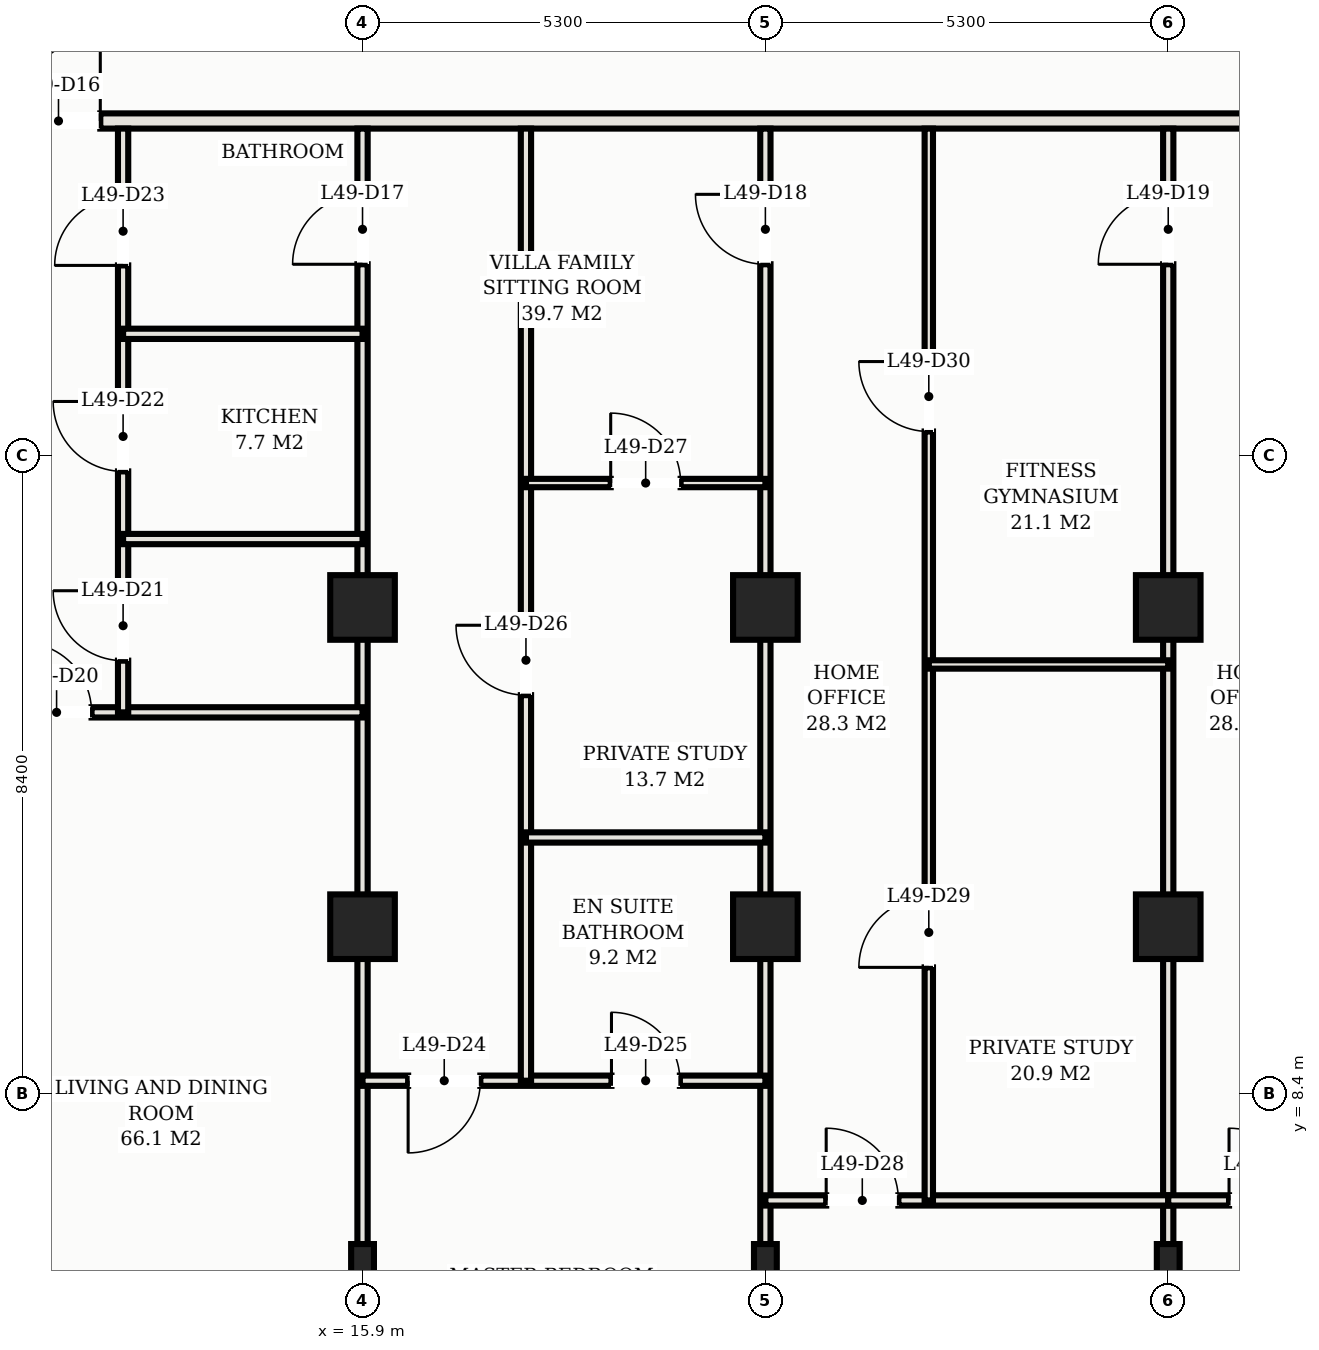
"""IFC4 building model, lengths in metres.
Left out: names, types, materials, properties, quantities, classifications, styles, units other than length and angle.
Written with IfcOpenShell. Run it as: python <this file> out.ifc"""

import sys

from ifc_helpers import new_model, si_unit, direction, frame, frame_2d, origin, origin_2d, place, context, subcontext, project, spatial, rectangle, hollow_rectangle, extrude, element, fill, save


model = new_model("IFC4")
c1 = context("Model", 3, precision=1e-05, world=origin(), true_north=direction((0.0, 1.0)))
c2 = subcontext(c1, "Body", "Model", "MODEL_VIEW")
j1 = project(units=[si_unit("LENGTHUNIT", "METRE"), si_unit("PLANEANGLEUNIT", "RADIAN")], contexts=[c1])
p1 = place(None, origin())
s1 = spatial("IfcSite", under=j1, at=p1, CompositionType="ELEMENT")
p2 = place(p1, origin())
s2 = spatial("IfcBuilding", under=s1, at=p2, CompositionType="ELEMENT")
p3 = place(p2, frame((0.0, 0.0, 178.8)))
s3 = spatial("IfcBuildingStorey", under=s2, at=p3, CompositionType="ELEMENT", Elevation=178.8)
for number, where, z_axis, x_axis in (
    (1, (15.9, 14.8, 0.0), (0.0, 0.0, 1.0), (1.0, 0.0, 0.0)),
    (2, (15.9, 10.6, 0.0), (0.0, 0.0, 1.0), (1.0, 0.0, 0.0)),
    (3, (21.2, 14.8, 0.0), (0.0, 0.0, 1.0), (1.0, 0.0, 0.0)),
    (4, (21.2, 10.6, 0.0), (0.0, 0.0, 1.0), (1.0, 0.0, 0.0)),
    (5, (26.5, 14.8, 0.0), (0.0, 0.0, 1.0), (1.0, 0.0, 0.0)),
    (6, (26.5, 10.6, 0.0), (0.0, 0.0, 1.0), (1.0, 0.0, 0.0)),
):
    element("IfcColumn", number, at=place(p3, frame(where, z_axis=z_axis, x_axis=x_axis)), inside=s3, PredefinedType="COLUMN", context=c2, shape_type="SweptSolid", body=[
        extrude(hollow_rectangle(XDim=0.85, YDim=0.85, WallThickness=0.028, at=origin_2d()), origin(), (0.0, 0.0, 1.0), 3.3),
    ])
for number, where, z_axis, x_axis in (
    (7, (15.9, 6.2, 0.0), (0.0, 0.0, 1.0), (1.0, 0.0, 0.0)),
    (8, (21.2, 6.2, 0.0), (0.0, 0.0, 1.0), (1.0, 0.0, 0.0)),
    (9, (26.5, 6.2, 0.0), (0.0, 0.0, 1.0), (1.0, 0.0, 0.0)),
):
    element("IfcColumn", number, at=place(p3, frame(where, z_axis=z_axis, x_axis=x_axis)), inside=s3, PredefinedType="COLUMN", context=c2, shape_type="SweptSolid", body=[
        extrude(hollow_rectangle(XDim=0.3, YDim=0.45, WallThickness=0.016, at=origin_2d()), origin(), (0.0, 0.0, 1.0), 3.3),
    ])
p4 = place(p3, frame((4.32, 21.2, 0.0), z_axis=(0.0, 0.0, 1.0), x_axis=(1.0, 0.0, 0.0)))
e10 = element("IfcWall", 10, at=p4, inside=s3, PredefinedType="PARTITIONING", context=c2, shape_type="SweptSolid", body=[
    extrude(rectangle(XDim=44.36, YDim=0.2, at=frame_2d((22.18, 0.0))), origin(), (0.0, 0.0, 1.0), 2.38),
])
p5 = place(p4, frame((7.03, 0.0, 0.0)))
e11 = element("IfcOpeningElement", 11, at=p5, cuts=e10, PredefinedType="OPENING", context=c2, shape_type="SweptSolid", body=[
    extrude(rectangle(XDim=1.1, YDim=2.25, at=frame_2d((0.55, 1.125))), frame((0.0, 0.11, 0.0), z_axis=(0.0, -1.0, 0.0), x_axis=(1.0, 0.0, 0.0)), (0.0, 0.0, 1.0), 0.22),
])
p6 = place(p4, frame((28.23, 0.0, 0.0)))
e12 = element("IfcOpeningElement", 12, at=p6, cuts=e10, PredefinedType="OPENING", context=c2, shape_type="SweptSolid", body=[
    extrude(rectangle(XDim=1.1, YDim=2.25, at=frame_2d((0.55, 1.125))), frame((0.0, 0.11, 0.0), z_axis=(0.0, -1.0, 0.0), x_axis=(1.0, 0.0, 0.0)), (0.0, 0.0, 1.0), 0.22),
])
p7 = place(p4, frame((2.635, 0.0, 0.0)))
e13 = element("IfcOpeningElement", 13, at=p7, cuts=e10, PredefinedType="OPENING", context=c2, shape_type="SweptSolid", body=[
    extrude(rectangle(XDim=0.92, YDim=2.15, at=frame_2d((0.46, 1.075))), frame((0.0, 0.11, 0.0), z_axis=(0.0, -1.0, 0.0), x_axis=(1.0, 0.0, 0.0)), (0.0, 0.0, 1.0), 0.22),
])
p8 = place(p4, frame((40.805, 0.0, 0.0)))
e14 = element("IfcOpeningElement", 14, at=p8, cuts=e10, PredefinedType="OPENING", context=c2, shape_type="SweptSolid", body=[
    extrude(rectangle(XDim=0.92, YDim=2.15, at=frame_2d((0.46, 1.075))), frame((0.0, 0.11, 0.0), z_axis=(0.0, -1.0, 0.0), x_axis=(1.0, 0.0, 0.0)), (0.0, 0.0, 1.0), 0.22),
])
p9 = place(p3, frame((15.9, 3.62, 0.0), z_axis=(0.0, 0.0, 1.0), x_axis=(0.0, 1.0, 0.0)))
e15 = element("IfcWall", 15, at=p9, inside=s3, PredefinedType="PARTITIONING", context=c2, shape_type="SweptSolid", body=[
    extrude(rectangle(XDim=17.48, YDim=0.135, at=frame_2d((8.74, 0.0))), origin(), (0.0, 0.0, 1.0), 2.38),
])
p10 = place(p9, frame((15.695, 0.0, 0.0)))
e16 = element("IfcOpeningElement", 16, at=p10, cuts=e15, PredefinedType="OPENING", context=c2, shape_type="SweptSolid", body=[
    extrude(rectangle(XDim=0.92, YDim=2.15, at=frame_2d((0.46, 1.075))), frame((0.0, 0.078, 0.0), z_axis=(0.0, -1.0, 0.0), x_axis=(1.0, 0.0, 0.0)), (0.0, 0.0, 1.0), 0.155),
])
p11 = place(p3, frame((21.2, 2.508, 0.0), z_axis=(0.0, 0.0, 1.0), x_axis=(0.0, 1.0, 0.0)))
e17 = element("IfcWall", 17, at=p11, inside=s3, PredefinedType="PARTITIONING", context=c2, shape_type="SweptSolid", body=[
    extrude(rectangle(XDim=18.592, YDim=0.135, at=frame_2d((9.296, 0.0))), origin(), (0.0, 0.0, 1.0), 2.38),
])
p12 = place(p11, frame((16.807, 0.0, 0.0)))
e18 = element("IfcOpeningElement", 18, at=p12, cuts=e17, PredefinedType="OPENING", context=c2, shape_type="SweptSolid", body=[
    extrude(rectangle(XDim=0.92, YDim=2.15, at=frame_2d((0.46, 1.075))), frame((0.0, 0.078, 0.0), z_axis=(0.0, -1.0, 0.0), x_axis=(1.0, 0.0, 0.0)), (0.0, 0.0, 1.0), 0.155),
])
p13 = place(p3, frame((26.5, 1.82, 0.0), z_axis=(0.0, 0.0, 1.0), x_axis=(0.0, 1.0, 0.0)))
e19 = element("IfcWall", 19, at=p13, inside=s3, PredefinedType="PARTITIONING", context=c2, shape_type="SweptSolid", body=[
    extrude(rectangle(XDim=19.28, YDim=0.135, at=frame_2d((9.64, 0.0))), origin(), (0.0, 0.0, 1.0), 2.38),
])
p14 = place(p13, frame((17.495, 0.0, 0.0)))
e20 = element("IfcOpeningElement", 20, at=p14, cuts=e19, PredefinedType="OPENING", context=c2, shape_type="SweptSolid", body=[
    extrude(rectangle(XDim=0.92, YDim=2.15, at=frame_2d((0.46, 1.075))), frame((0.0, 0.078, 0.0), z_axis=(0.0, -1.0, 0.0), x_axis=(1.0, 0.0, 0.0)), (0.0, 0.0, 1.0), 0.155),
])
p15 = place(p3, frame((10.6, 13.42, 0.0), z_axis=(0.0, 0.0, 1.0), x_axis=(1.0, 0.0, 0.0)))
e21 = element("IfcWall", 21, at=p15, inside=s3, PredefinedType="PARTITIONING", context=c2, shape_type="SweptSolid", body=[
    extrude(rectangle(XDim=5.3, YDim=0.135, at=frame_2d((2.65, 0.0))), origin(), (0.0, 0.0, 1.0), 2.38),
])
p16 = place(p15, frame((0.815, 0.0, 0.0)))
e22 = element("IfcOpeningElement", 22, at=p16, cuts=e21, PredefinedType="OPENING", context=c2, shape_type="SweptSolid", body=[
    extrude(rectangle(XDim=0.92, YDim=2.15, at=frame_2d((0.46, 1.075))), frame((0.0, 0.078, 0.0), z_axis=(0.0, -1.0, 0.0), x_axis=(1.0, 0.0, 0.0)), (0.0, 0.0, 1.0), 0.155),
])
p17 = place(p3, frame((12.75, 13.42, 0.0), z_axis=(0.0, 0.0, 1.0), x_axis=(0.0, 1.0, 0.0)))
e23 = element("IfcWall", 23, at=p17, inside=s3, PredefinedType="PARTITIONING", context=c2, shape_type="SweptSolid", body=[
    extrude(rectangle(XDim=7.68, YDim=0.135, at=frame_2d((3.84, 0.0))), origin(), (0.0, 0.0, 1.0), 2.38),
])
p18 = place(p17, frame((0.68, 0.0, 0.0)))
e24 = element("IfcOpeningElement", 24, at=p18, cuts=e23, PredefinedType="OPENING", context=c2, shape_type="SweptSolid", body=[
    extrude(rectangle(XDim=0.92, YDim=2.15, at=frame_2d((0.46, 1.075))), frame((0.0, 0.078, 0.0), z_axis=(0.0, -1.0, 0.0), x_axis=(1.0, 0.0, 0.0)), (0.0, 0.0, 1.0), 0.155),
])
p19 = place(p17, frame((3.17, 0.0, 0.0)))
e25 = element("IfcOpeningElement", 25, at=p19, cuts=e23, PredefinedType="OPENING", context=c2, shape_type="SweptSolid", body=[
    extrude(rectangle(XDim=0.92, YDim=2.15, at=frame_2d((0.46, 1.075))), frame((0.0, 0.078, 0.0), z_axis=(0.0, -1.0, 0.0), x_axis=(1.0, 0.0, 0.0)), (0.0, 0.0, 1.0), 0.155),
])
p20 = place(p17, frame((5.88, 0.0, 0.0)))
e26 = element("IfcOpeningElement", 26, at=p20, cuts=e23, PredefinedType="OPENING", context=c2, shape_type="SweptSolid", body=[
    extrude(rectangle(XDim=0.9, YDim=2.15, at=frame_2d((0.45, 1.075))), frame((0.0, 0.078, 0.0), z_axis=(0.0, -1.0, 0.0), x_axis=(1.0, 0.0, 0.0)), (0.0, 0.0, 1.0), 0.155),
])
for number, where, z_axis, x_axis in (
    (27, (12.75, 15.7, 0.0), (0.0, 0.0, 1.0), (1.0, 0.0, 0.0)),
    (28, (12.75, 18.4, 0.0), (0.0, 0.0, 1.0), (1.0, 0.0, 0.0)),
):
    element("IfcWall", number, at=place(p3, frame(where, z_axis=z_axis, x_axis=x_axis)), inside=s3, PredefinedType="PARTITIONING", context=c2, shape_type="SweptSolid", body=[
        extrude(rectangle(XDim=3.15, YDim=0.135, at=frame_2d((1.575, 0.0))), origin(), (0.0, 0.0, 1.0), 2.38),
    ])
p21 = place(p3, frame((15.9, 8.574, 0.0), z_axis=(0.0, 0.0, 1.0), x_axis=(1.0, 0.0, 0.0)))
e29 = element("IfcWall", 29, at=p21, inside=s3, PredefinedType="PARTITIONING", context=c2, shape_type="SweptSolid", body=[
    extrude(rectangle(XDim=5.3, YDim=0.135, at=frame_2d((2.65, 0.0))), origin(), (0.0, 0.0, 1.0), 2.38),
])
p22 = place(p21, frame((0.6, 0.0, 0.0)))
e30 = element("IfcOpeningElement", 30, at=p22, cuts=e29, PredefinedType="OPENING", context=c2, shape_type="SweptSolid", body=[
    extrude(rectangle(XDim=0.95, YDim=2.15, at=frame_2d((0.475, 1.075))), frame((0.0, 0.078, 0.0), z_axis=(0.0, -1.0, 0.0), x_axis=(1.0, 0.0, 0.0)), (0.0, 0.0, 1.0), 0.155),
])
p23 = place(p21, frame((3.275, 0.0, 0.0)))
e31 = element("IfcOpeningElement", 31, at=p23, cuts=e29, PredefinedType="OPENING", context=c2, shape_type="SweptSolid", body=[
    extrude(rectangle(XDim=0.9, YDim=2.15, at=frame_2d((0.45, 1.075))), frame((0.0, 0.078, 0.0), z_axis=(0.0, -1.0, 0.0), x_axis=(1.0, 0.0, 0.0)), (0.0, 0.0, 1.0), 0.155),
])
p24 = place(p3, frame((18.05, 8.574, 0.0), z_axis=(0.0, 0.0, 1.0), x_axis=(0.0, 1.0, 0.0)))
e32 = element("IfcWall", 32, at=p24, inside=s3, PredefinedType="PARTITIONING", context=c2, shape_type="SweptSolid", body=[
    extrude(rectangle(XDim=12.526, YDim=0.135, at=frame_2d((6.263, 0.0))), origin(), (0.0, 0.0, 1.0), 2.38),
])
p25 = place(p24, frame((5.072, 0.0, 0.0)))
e33 = element("IfcOpeningElement", 33, at=p25, cuts=e32, PredefinedType="OPENING", context=c2, shape_type="SweptSolid", body=[
    extrude(rectangle(XDim=0.92, YDim=2.15, at=frame_2d((0.46, 1.075))), frame((0.0, 0.078, 0.0), z_axis=(0.0, -1.0, 0.0), x_axis=(1.0, 0.0, 0.0)), (0.0, 0.0, 1.0), 0.155),
])
p26 = place(p3, frame((18.05, 11.774, 0.0), z_axis=(0.0, 0.0, 1.0), x_axis=(1.0, 0.0, 0.0)))
e34 = element("IfcWall", 34, at=p26, inside=s3, PredefinedType="PARTITIONING", context=c2, shape_type="SweptSolid", body=[
    extrude(rectangle(XDim=3.15, YDim=0.135, at=frame_2d((1.575, 0.0))), origin(), (0.0, 0.0, 1.0), 2.38),
])
p27 = place(p3, frame((18.05, 16.437, 0.0), z_axis=(0.0, 0.0, 1.0), x_axis=(1.0, 0.0, 0.0)))
e35 = element("IfcWall", 35, at=p27, inside=s3, PredefinedType="MOVABLE", context=c2, shape_type="SweptSolid", body=[
    extrude(rectangle(XDim=3.15, YDim=0.11, at=frame_2d((1.575, 0.0))), origin(), (0.0, 0.0, 1.0), 2.38),
])
p28 = place(p27, frame((1.115, 0.0, 0.0)))
e36 = element("IfcOpeningElement", 36, at=p28, cuts=e35, PredefinedType="OPENING", context=c2, shape_type="SweptSolid", body=[
    extrude(rectangle(XDim=0.92, YDim=2.15, at=frame_2d((0.46, 1.075))), frame((0.0, 0.065, 0.0), z_axis=(0.0, -1.0, 0.0), x_axis=(1.0, 0.0, 0.0)), (0.0, 0.0, 1.0), 0.13),
])
p29 = place(p3, frame((21.2, 6.999, 0.0), z_axis=(0.0, 0.0, 1.0), x_axis=(1.0, 0.0, 0.0)))
e37 = element("IfcWall", 37, at=p29, inside=s3, PredefinedType="PARTITIONING", context=c2, shape_type="SweptSolid", body=[
    extrude(rectangle(XDim=5.3, YDim=0.135, at=frame_2d((2.65, 0.0))), origin(), (0.0, 0.0, 1.0), 2.38),
])
p30 = place(p29, frame((0.8, 0.0, 0.0)))
e38 = element("IfcOpeningElement", 38, at=p30, cuts=e37, PredefinedType="OPENING", context=c2, shape_type="SweptSolid", body=[
    extrude(rectangle(XDim=0.95, YDim=2.15, at=frame_2d((0.475, 1.075))), frame((0.0, 0.078, 0.0), z_axis=(0.0, -1.0, 0.0), x_axis=(1.0, 0.0, 0.0)), (0.0, 0.0, 1.0), 0.155),
])
p31 = place(p3, frame((23.35, 6.999, 0.0), z_axis=(0.0, 0.0, 1.0), x_axis=(0.0, 1.0, 0.0)))
e39 = element("IfcWall", 39, at=p31, inside=s3, PredefinedType="MOVABLE", context=c2, shape_type="SweptSolid", body=[
    extrude(rectangle(XDim=14.101, YDim=0.11, at=frame_2d((7.051, 0.0))), origin(), (0.0, 0.0, 1.0), 2.38),
])
p32 = place(p31, frame((3.066, 0.0, 0.0)))
e40 = element("IfcOpeningElement", 40, at=p32, cuts=e39, PredefinedType="OPENING", context=c2, shape_type="SweptSolid", body=[
    extrude(rectangle(XDim=0.92, YDim=2.15, at=frame_2d((0.46, 1.075))), frame((0.0, 0.065, 0.0), z_axis=(0.0, -1.0, 0.0), x_axis=(1.0, 0.0, 0.0)), (0.0, 0.0, 1.0), 0.13),
])
p33 = place(p31, frame((10.116, 0.0, 0.0)))
e41 = element("IfcOpeningElement", 41, at=p33, cuts=e39, PredefinedType="OPENING", context=c2, shape_type="SweptSolid", body=[
    extrude(rectangle(XDim=0.92, YDim=2.15, at=frame_2d((0.46, 1.075))), frame((0.0, 0.065, 0.0), z_axis=(0.0, -1.0, 0.0), x_axis=(1.0, 0.0, 0.0)), (0.0, 0.0, 1.0), 0.13),
])
p34 = place(p3, frame((23.35, 14.05, 0.0), z_axis=(0.0, 0.0, 1.0), x_axis=(1.0, 0.0, 0.0)))
e42 = element("IfcWall", 42, at=p34, inside=s3, PredefinedType="MOVABLE", context=c2, shape_type="SweptSolid", body=[
    extrude(rectangle(XDim=3.15, YDim=0.11, at=frame_2d((1.575, 0.0))), origin(), (0.0, 0.0, 1.0), 2.38),
])
p35 = place(p3, frame((26.5, 6.999, 0.0), z_axis=(0.0, 0.0, 1.0), x_axis=(1.0, 0.0, 0.0)))
e43 = element("IfcWall", 43, at=p35, inside=s3, PredefinedType="PARTITIONING", context=c2, shape_type="SweptSolid", body=[
    extrude(rectangle(XDim=5.3, YDim=0.135, at=frame_2d((2.65, 0.0))), origin(), (0.0, 0.0, 1.0), 2.38),
])
p36 = place(p35, frame((0.8, 0.0, 0.0)))
e44 = element("IfcOpeningElement", 44, at=p36, cuts=e43, PredefinedType="OPENING", context=c2, shape_type="SweptSolid", body=[
    extrude(rectangle(XDim=0.95, YDim=2.15, at=frame_2d((0.475, 1.075))), frame((0.0, 0.078, 0.0), z_axis=(0.0, -1.0, 0.0), x_axis=(1.0, 0.0, 0.0)), (0.0, 0.0, 1.0), 0.155),
])
p37 = place(p5, origin())
e45 = element("IfcDoor", 45, at=p37, inside=s3, OperationType="SINGLE_SWING_RIGHT", PredefinedType="DOOR", context=c2, shape_type="SweptSolid", body=[
    extrude(rectangle(XDim=1.1, YDim=2.25, at=frame_2d((0.55, 1.125))), frame((0.0, 0.025, 0.0), z_axis=(0.0, -1.0, 0.0), x_axis=(1.0, 0.0, 0.0)), (0.0, 0.0, 1.0), 0.05),
])
fill(e11, e45)
p38 = place(p10, origin())
e46 = element("IfcDoor", 46, at=p38, inside=s3, OperationType="SINGLE_SWING_LEFT", PredefinedType="DOOR", context=c2, shape_type="SweptSolid", body=[
    extrude(rectangle(XDim=0.92, YDim=2.15, at=frame_2d((0.46, 1.075))), frame((0.0, 0.025, 0.0), z_axis=(0.0, -1.0, 0.0), x_axis=(1.0, 0.0, 0.0)), (0.0, 0.0, 1.0), 0.05),
])
fill(e16, e46)
p39 = place(p12, origin())
e47 = element("IfcDoor", 47, at=p39, inside=s3, OperationType="SINGLE_SWING_RIGHT", PredefinedType="DOOR", context=c2, shape_type="SweptSolid", body=[
    extrude(rectangle(XDim=0.92, YDim=2.15, at=frame_2d((0.46, 1.075))), frame((0.0, 0.025, 0.0), z_axis=(0.0, -1.0, 0.0), x_axis=(1.0, 0.0, 0.0)), (0.0, 0.0, 1.0), 0.05),
])
fill(e18, e47)
p40 = place(p14, origin())
e48 = element("IfcDoor", 48, at=p40, inside=s3, OperationType="SINGLE_SWING_LEFT", PredefinedType="DOOR", context=c2, shape_type="SweptSolid", body=[
    extrude(rectangle(XDim=0.92, YDim=2.15, at=frame_2d((0.46, 1.075))), frame((0.0, 0.025, 0.0), z_axis=(0.0, -1.0, 0.0), x_axis=(1.0, 0.0, 0.0)), (0.0, 0.0, 1.0), 0.05),
])
fill(e20, e48)
p41 = place(p16, origin())
e49 = element("IfcDoor", 49, at=p41, inside=s3, OperationType="SINGLE_SWING_LEFT", PredefinedType="DOOR", context=c2, shape_type="SweptSolid", body=[
    extrude(rectangle(XDim=0.92, YDim=2.15, at=frame_2d((0.46, 1.075))), frame((0.0, 0.025, 0.0), z_axis=(0.0, -1.0, 0.0), x_axis=(1.0, 0.0, 0.0)), (0.0, 0.0, 1.0), 0.05),
])
fill(e22, e49)
p42 = place(p18, origin())
e50 = element("IfcDoor", 50, at=p42, inside=s3, OperationType="SINGLE_SWING_RIGHT", PredefinedType="DOOR", context=c2, shape_type="SweptSolid", body=[
    extrude(rectangle(XDim=0.92, YDim=2.15, at=frame_2d((0.46, 1.075))), frame((0.0, 0.025, 0.0), z_axis=(0.0, -1.0, 0.0), x_axis=(1.0, 0.0, 0.0)), (0.0, 0.0, 1.0), 0.05),
])
fill(e24, e50)
p43 = place(p19, origin())
e51 = element("IfcDoor", 51, at=p43, inside=s3, OperationType="SINGLE_SWING_RIGHT", PredefinedType="DOOR", context=c2, shape_type="SweptSolid", body=[
    extrude(rectangle(XDim=0.92, YDim=2.15, at=frame_2d((0.46, 1.075))), frame((0.0, 0.025, 0.0), z_axis=(0.0, -1.0, 0.0), x_axis=(1.0, 0.0, 0.0)), (0.0, 0.0, 1.0), 0.05),
])
fill(e25, e51)
p44 = place(p20, origin())
e52 = element("IfcDoor", 52, at=p44, inside=s3, OperationType="SINGLE_SWING_LEFT", PredefinedType="DOOR", context=c2, shape_type="SweptSolid", body=[
    extrude(rectangle(XDim=0.9, YDim=2.15, at=frame_2d((0.45, 1.075))), frame((0.0, 0.025, 0.0), z_axis=(0.0, -1.0, 0.0), x_axis=(1.0, 0.0, 0.0)), (0.0, 0.0, 1.0), 0.05),
])
fill(e26, e52)
p45 = place(p22, frame((0.95, 0.0, 0.0), z_axis=(0.0, 0.0, 1.0), x_axis=(-1.0, 0.0, 0.0)))
e53 = element("IfcDoor", 53, at=p45, inside=s3, OperationType="SINGLE_SWING_RIGHT", PredefinedType="DOOR", context=c2, shape_type="SweptSolid", body=[
    extrude(rectangle(XDim=0.95, YDim=2.15, at=frame_2d((0.475, 1.075))), frame((0.0, 0.025, 0.0), z_axis=(0.0, -1.0, 0.0), x_axis=(1.0, 0.0, 0.0)), (0.0, 0.0, 1.0), 0.05),
])
fill(e30, e53)
p46 = place(p23, origin())
e54 = element("IfcDoor", 54, at=p46, inside=s3, OperationType="SINGLE_SWING_LEFT", PredefinedType="DOOR", context=c2, shape_type="SweptSolid", body=[
    extrude(rectangle(XDim=0.9, YDim=2.15, at=frame_2d((0.45, 1.075))), frame((0.0, 0.025, 0.0), z_axis=(0.0, -1.0, 0.0), x_axis=(1.0, 0.0, 0.0)), (0.0, 0.0, 1.0), 0.05),
])
fill(e31, e54)
p47 = place(p25, origin())
e55 = element("IfcDoor", 55, at=p47, inside=s3, OperationType="SINGLE_SWING_RIGHT", PredefinedType="DOOR", context=c2, shape_type="SweptSolid", body=[
    extrude(rectangle(XDim=0.92, YDim=2.15, at=frame_2d((0.46, 1.075))), frame((0.0, 0.025, 0.0), z_axis=(0.0, -1.0, 0.0), x_axis=(1.0, 0.0, 0.0)), (0.0, 0.0, 1.0), 0.05),
])
fill(e33, e55)
p48 = place(p28, origin())
e56 = element("IfcDoor", 56, at=p48, inside=s3, OperationType="SINGLE_SWING_LEFT", PredefinedType="DOOR", context=c2, shape_type="SweptSolid", body=[
    extrude(rectangle(XDim=0.92, YDim=2.15, at=frame_2d((0.46, 1.075))), frame((0.0, 0.025, 0.0), z_axis=(0.0, -1.0, 0.0), x_axis=(1.0, 0.0, 0.0)), (0.0, 0.0, 1.0), 0.05),
])
fill(e36, e56)
p49 = place(p30, origin())
e57 = element("IfcDoor", 57, at=p49, inside=s3, OperationType="SINGLE_SWING_LEFT", PredefinedType="DOOR", context=c2, shape_type="SweptSolid", body=[
    extrude(rectangle(XDim=0.95, YDim=2.15, at=frame_2d((0.475, 1.075))), frame((0.0, 0.025, 0.0), z_axis=(0.0, -1.0, 0.0), x_axis=(1.0, 0.0, 0.0)), (0.0, 0.0, 1.0), 0.05),
])
fill(e38, e57)
p50 = place(p32, origin())
e58 = element("IfcDoor", 58, at=p50, inside=s3, OperationType="SINGLE_SWING_LEFT", PredefinedType="DOOR", context=c2, shape_type="SweptSolid", body=[
    extrude(rectangle(XDim=0.92, YDim=2.15, at=frame_2d((0.46, 1.075))), frame((0.0, 0.025, 0.0), z_axis=(0.0, -1.0, 0.0), x_axis=(1.0, 0.0, 0.0)), (0.0, 0.0, 1.0), 0.05),
])
fill(e40, e58)
p51 = place(p33, origin())
e59 = element("IfcDoor", 59, at=p51, inside=s3, OperationType="SINGLE_SWING_RIGHT", PredefinedType="DOOR", context=c2, shape_type="SweptSolid", body=[
    extrude(rectangle(XDim=0.92, YDim=2.15, at=frame_2d((0.46, 1.075))), frame((0.0, 0.025, 0.0), z_axis=(0.0, -1.0, 0.0), x_axis=(1.0, 0.0, 0.0)), (0.0, 0.0, 1.0), 0.05),
])
fill(e41, e59)
p52 = place(p36, origin())
e60 = element("IfcDoor", 60, at=p52, inside=s3, OperationType="SINGLE_SWING_LEFT", PredefinedType="DOOR", context=c2, shape_type="SweptSolid", body=[
    extrude(rectangle(XDim=0.95, YDim=2.15, at=frame_2d((0.475, 1.075))), frame((0.0, 0.025, 0.0), z_axis=(0.0, -1.0, 0.0), x_axis=(1.0, 0.0, 0.0)), (0.0, 0.0, 1.0), 0.05),
])
fill(e44, e60)
save(model, sys.argv[1])
